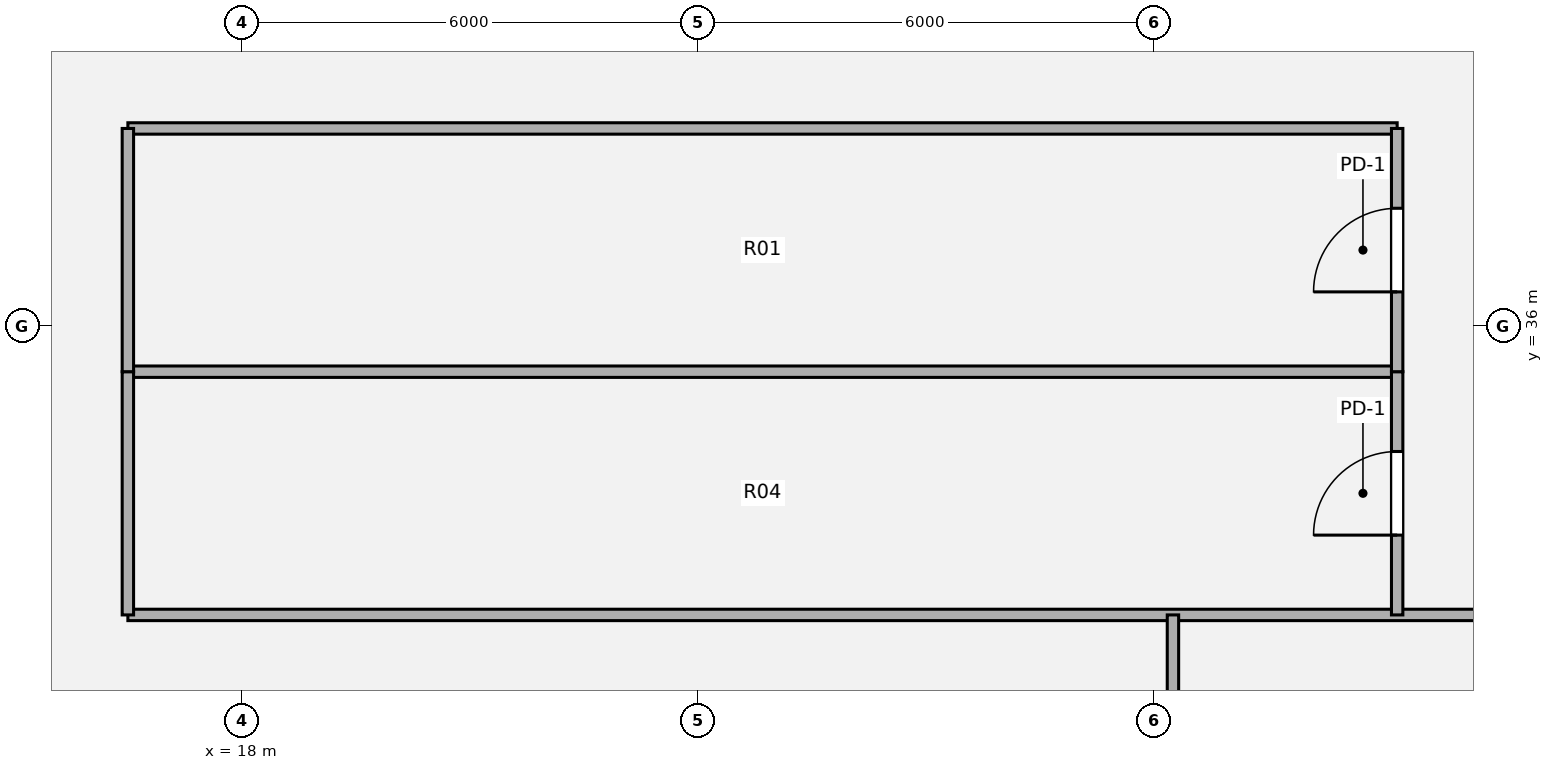
"""IFC4 building model, lengths in metres.
Left out: names, types, materials, properties, quantities, classifications, styles, units other than length and angle.
Written with IfcOpenShell. Run it as: python <this file> out.ifc"""

import sys

from ifc_helpers import new_model, si_unit, direction, frame, frame_2d, origin, origin_2d, place, context, subcontext, project, spatial, rectangle, hollow_circle, extrude, source, transform, mapped, element, fill, save


model = new_model("IFC4")
c1 = context("Model", 3, precision=1e-05, world=origin(), true_north=direction((0.0, 1.0)))
c2 = subcontext(c1, "Body", "Model", "MODEL_VIEW")
j1 = project(units=[si_unit("LENGTHUNIT", "METRE"), si_unit("PLANEANGLEUNIT", "RADIAN")], contexts=[c1])
p1 = place(None, origin())
s1 = spatial("IfcSite", under=j1, at=p1, CompositionType="ELEMENT")
p2 = place(p1, origin())
s2 = spatial("IfcBuilding", under=s1, at=p2, CompositionType="ELEMENT")
p3 = place(p2, frame((0.0, 0.0, 146.52)))
s3 = spatial("IfcBuildingStorey", under=s2, at=p3, CompositionType="ELEMENT", Elevation=146.52)
m1 = source(origin(), c2, "Body", "SweptSolid", [
    extrude(hollow_circle(Radius=0.65, WallThickness=0.045, at=origin_2d()), origin(), (0.0, 0.0, 1.0), 6.401),
])
p4 = place(p3, frame((15.932, 27.488, 0.428), z_axis=(0.149100545965, 0.611964481829, 0.776703611536), x_axis=(-0.971578452533, 0.236717786771, 0.0)))
e1 = element("IfcColumn", 1, at=p4, inside=s3, PredefinedType="COLUMN", context=c2, shape_type="MappedRepresentation", body=[
    mapped(m1, transform((0.0, 0.0, 0.0), x_axis=(1.0, 0.0, 0.0), y_axis=(0.0, 1.0, 0.0), z_axis=(0.0, 0.0, 1.0), scale=1.0)),
])
m2 = source(origin(), c2, "Body", "SweptSolid", [
    extrude(hollow_circle(Radius=0.65, WallThickness=0.045, at=origin_2d()), origin(), (0.0, 0.0, 1.0), 6.244),
])
p5 = place(p3, frame((15.929, 39.148, 0.41), z_axis=(0.153380159115, 0.581225961103, 0.799156373265), x_axis=(-0.96689991262, 0.255155950303, 0.0)))
e2 = element("IfcColumn", 2, at=p5, inside=s3, PredefinedType="COLUMN", context=c2, shape_type="MappedRepresentation", body=[
    mapped(m2, transform((0.0, 0.0, 0.0), x_axis=(1.0, 0.0, 0.0), y_axis=(0.0, 1.0, 0.0), z_axis=(0.0, 0.0, 1.0), scale=1.0)),
])
m3 = source(origin(), c2, "Body", "SweptSolid", [
    extrude(hollow_circle(Radius=0.65, WallThickness=0.045, at=origin_2d()), origin(), (0.0, 0.0, 1.0), 6.338),
])
p6 = place(p3, frame((31.35, 27.482, 0.421), z_axis=(0.0, 0.618885910055, 0.785480891133), x_axis=(-1.0, 0.0, 0.0)))
e3 = element("IfcColumn", 3, at=p6, inside=s3, PredefinedType="COLUMN", context=c2, shape_type="MappedRepresentation", body=[
    mapped(m3, transform((0.0, 0.0, 0.0), x_axis=(1.0, 0.0, 0.0), y_axis=(0.0, 1.0, 0.0), z_axis=(0.0, 0.0, 1.0), scale=1.0)),
])
p7 = place(p3, frame((16.5, 32.2, 0.0), z_axis=(0.0, 0.0, 1.0), x_axis=(1.0, 0.0, 0.0)))
e4 = element("IfcWall", 4, at=p7, inside=s3, PredefinedType="PARTITIONING", context=c2, shape_type="SweptSolid", body=[
    extrude(rectangle(XDim=18.0, YDim=0.15, at=frame_2d((9.0, 0.0))), origin(), (0.0, 0.0, 1.0), 5.05),
])
for number, where, z_axis, x_axis in (
    (5, (16.5, 35.4, 0.0), (0.0, 0.0, 1.0), (1.0, 0.0, 0.0)),
    (6, (16.5, 38.6, 0.0), (0.0, 0.0, 1.0), (1.0, 0.0, 0.0)),
):
    element("IfcWall", number, at=place(p3, frame(where, z_axis=z_axis, x_axis=x_axis)), inside=s3, PredefinedType="PARTITIONING", context=c2, shape_type="SweptSolid", body=[
        extrude(rectangle(XDim=16.7, YDim=0.15, at=frame_2d((8.35, 0.0))), origin(), (0.0, 0.0, 1.0), 4.532),
    ])
p8 = place(p3, frame((16.5, 32.2, 0.0), z_axis=(0.0, 0.0, 1.0), x_axis=(0.0, 1.0, 0.0)))
e7 = element("IfcWall", 7, at=p8, inside=s3, PredefinedType="PARTITIONING", context=c2, shape_type="SweptSolid", body=[
    extrude(rectangle(XDim=3.2, YDim=0.15, at=frame_2d((1.6, 0.0))), origin(), (0.0, 0.0, 1.0), 5.05),
])
p9 = place(p3, frame((16.5, 35.4, 0.0), z_axis=(0.0, 0.0, 1.0), x_axis=(0.0, 1.0, 0.0)))
e8 = element("IfcWall", 8, at=p9, inside=s3, PredefinedType="PARTITIONING", context=c2, shape_type="SweptSolid", body=[
    extrude(rectangle(XDim=3.2, YDim=0.15, at=frame_2d((1.6, 0.0))), origin(), (0.0, 0.0, 1.0), 5.05),
])
p10 = place(p3, frame((30.25, 20.4, 0.0), z_axis=(0.0, 0.0, 1.0), x_axis=(0.0, 1.0, 0.0)))
e9 = element("IfcWall", 9, at=p10, inside=s3, PredefinedType="PARTITIONING", context=c2, shape_type="SweptSolid", body=[
    extrude(rectangle(XDim=11.8, YDim=0.15, at=frame_2d((5.9, 0.0))), origin(), (0.0, 0.0, 1.0), 3.265),
])
p11 = place(p3, frame((33.2, 32.2, 0.0), z_axis=(0.0, 0.0, 1.0), x_axis=(0.0, 1.0, 0.0)))
e10 = element("IfcWall", 10, at=p11, inside=s3, PredefinedType="PARTITIONING", context=c2, shape_type="SweptSolid", body=[
    extrude(rectangle(XDim=3.2, YDim=0.15, at=frame_2d((1.6, 0.0))), origin(), (0.0, 0.0, 1.0), 5.05),
])
p12 = place(p11, frame((1.05, 0.0, 0.0)))
e11 = element("IfcOpeningElement", 11, at=p12, cuts=e10, PredefinedType="OPENING", context=c2, shape_type="SweptSolid", body=[
    extrude(rectangle(XDim=1.1, YDim=2.1, at=origin_2d()), frame((0.55, 0.085, 1.05), z_axis=(0.0, -1.0, 0.0), x_axis=(1.0, 0.0, 0.0)), (0.0, 0.0, 1.0), 0.17),
])
p13 = place(p3, frame((33.2, 35.4, 0.0), z_axis=(0.0, 0.0, 1.0), x_axis=(0.0, 1.0, 0.0)))
e12 = element("IfcWall", 12, at=p13, inside=s3, PredefinedType="PARTITIONING", context=c2, shape_type="SweptSolid", body=[
    extrude(rectangle(XDim=3.2, YDim=0.15, at=frame_2d((1.6, 0.0))), origin(), (0.0, 0.0, 1.0), 5.05),
])
p14 = place(p13, frame((1.05, 0.0, 0.0)))
e13 = element("IfcOpeningElement", 13, at=p14, cuts=e12, PredefinedType="OPENING", context=c2, shape_type="SweptSolid", body=[
    extrude(rectangle(XDim=1.1, YDim=2.1, at=origin_2d()), frame((0.55, 0.085, 1.05), z_axis=(0.0, -1.0, 0.0), x_axis=(1.0, 0.0, 0.0)), (0.0, 0.0, 1.0), 0.17),
])
m4 = source(origin(), c2, "Body", "SweptSolid", [
    extrude(rectangle(XDim=1.1, YDim=2.1, at=origin_2d()), frame((0.55, 0.025, 1.05), z_axis=(0.0, -1.0, 0.0), x_axis=(1.0, 0.0, 0.0)), (0.0, 0.0, 1.0), 0.05),
])
p15 = place(p12, origin())
e14 = element("IfcDoor", 14, at=p15, inside=s3, OperationType="SINGLE_SWING_LEFT", PredefinedType="DOOR", context=c2, shape_type="MappedRepresentation", body=[
    mapped(m4, transform((0.0, 0.0, 0.0), x_axis=(1.0, 0.0, 0.0), y_axis=(0.0, 1.0, 0.0), z_axis=(0.0, 0.0, 1.0), scale=1.0)),
])
fill(e11, e14)
p16 = place(p14, origin())
e15 = element("IfcDoor", 15, at=p16, inside=s3, OperationType="SINGLE_SWING_LEFT", PredefinedType="DOOR", context=c2, shape_type="MappedRepresentation", body=[
    mapped(m4, transform((0.0, 0.0, 0.0), x_axis=(1.0, 0.0, 0.0), y_axis=(0.0, 1.0, 0.0), z_axis=(0.0, 0.0, 1.0), scale=1.0)),
])
fill(e13, e15)
save(model, sys.argv[1])
